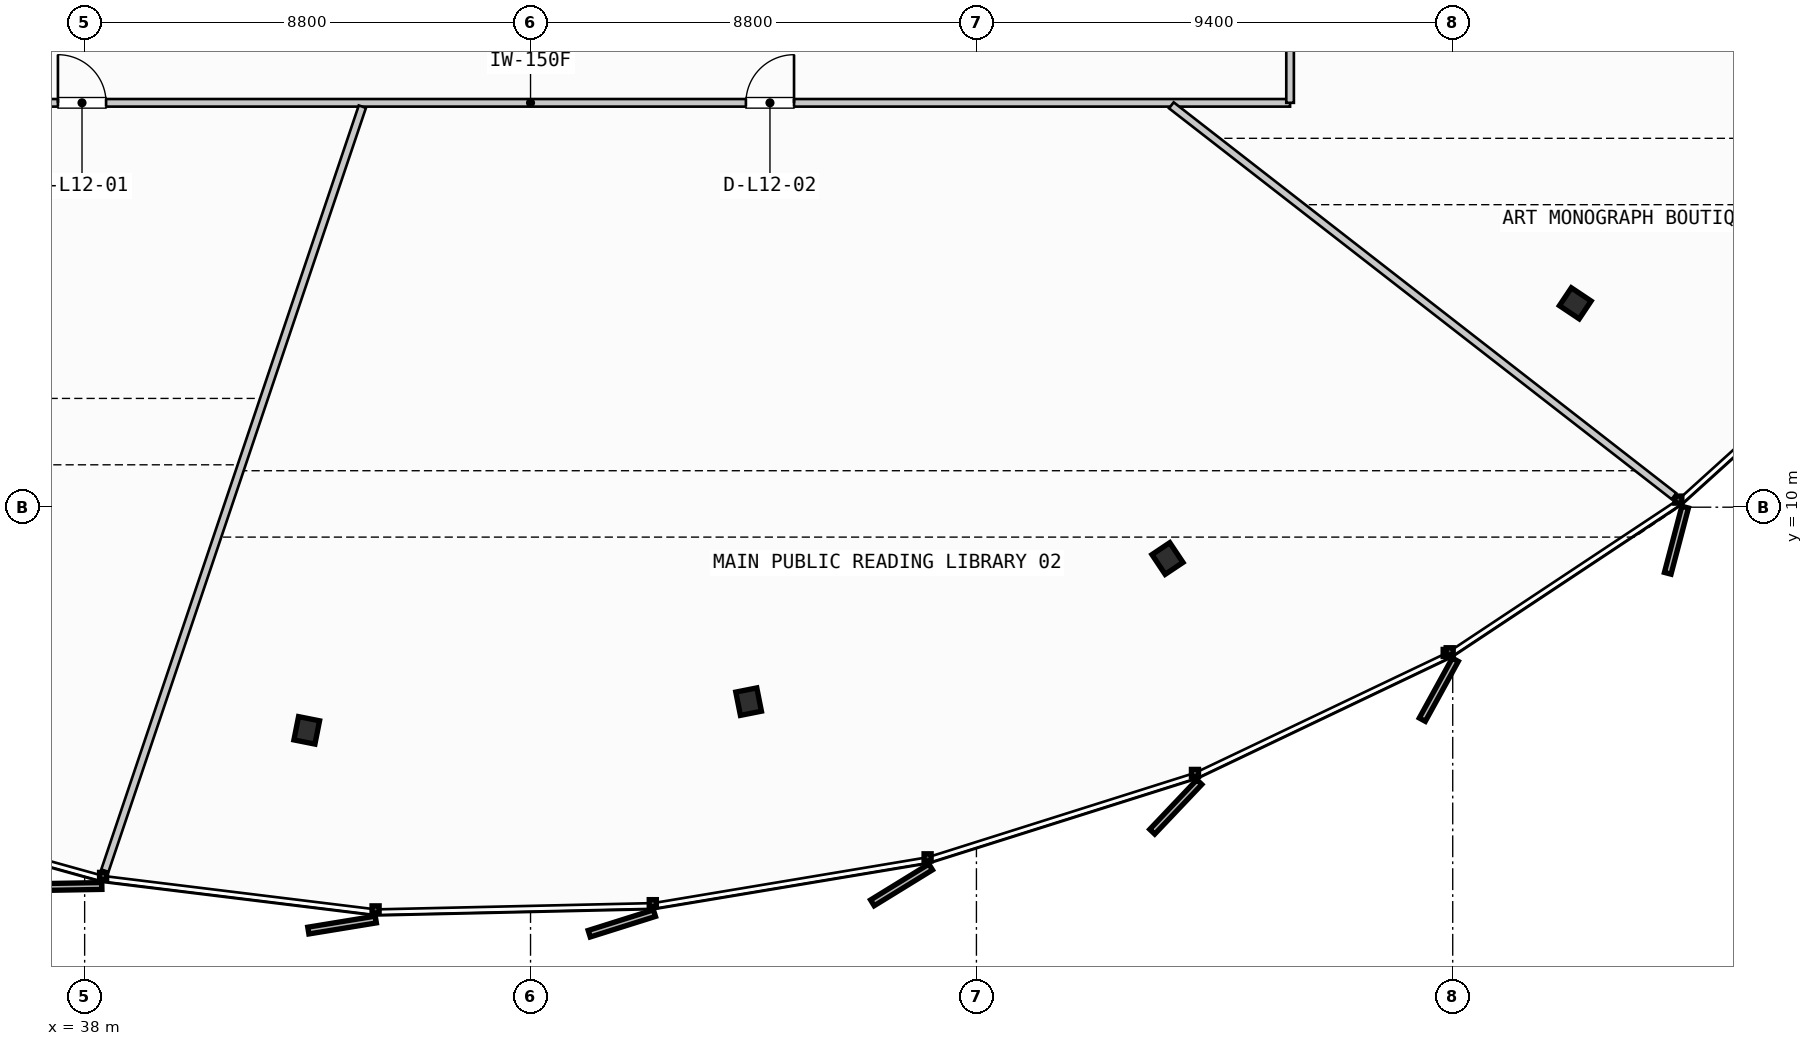
"""IFC4 building model, lengths in metres.
Left out: names, types, materials, properties, quantities, classifications, styles, units other than length and angle.
Written with IfcOpenShell. Run it as: python <this file> out.ifc"""

import sys

from ifc_helpers import new_model, si_unit, direction, frame, frame_2d, origin, origin_2d, place, context, subcontext, project, spatial, rectangle, i_section, extrude, source, transform, mapped, element, fill, save


model = new_model("IFC4")
c1 = context("Model", 3, precision=1e-05, world=origin(), true_north=direction((0.0, 1.0)))
c2 = subcontext(c1, "Body", "Model", "MODEL_VIEW")
j1 = project(units=[si_unit("LENGTHUNIT", "METRE"), si_unit("PLANEANGLEUNIT", "RADIAN")], contexts=[c1])
p1 = place(None, origin())
s1 = spatial("IfcSite", under=j1, at=p1, CompositionType="ELEMENT")
p2 = place(p1, origin())
s2 = spatial("IfcBuilding", under=s1, at=p2, CompositionType="ELEMENT")
p3 = place(p2, frame((0.0, 0.0, 52.4)))
s3 = spatial("IfcBuildingStorey", under=s2, at=p3, CompositionType="ELEMENT", Elevation=52.4)
m1 = source(origin(), c2, "Body", "SweptSolid", [
    extrude(i_section(OverallWidth=0.423, OverallDepth=0.469, WebThickness=0.051, FlangeThickness=0.081, FilletRadius=0.015, at=origin_2d()), origin(), (0.0, 0.0, 1.0), 3.55),
])
for number, where, z_axis, x_axis in (
    (1, (42.383, 5.596, 0.0), (0.0, 0.0, 1.0), (-0.195, -0.981, 0.0)),
    (2, (51.104, 6.163, 0.0), (0.0, 0.0, 1.0), (0.195, -0.981, 0.0)),
    (3, (59.37, 8.987, 0.0), (0.0, 0.0, 1.0), (0.556, -0.831, 0.0)),
    (4, (67.418, 14.023, 0.0), (0.0, 0.0, 1.0), (0.831, -0.556, 0.0)),
):
    element("IfcColumn", number, at=place(p3, frame(where, z_axis=z_axis, x_axis=x_axis)), inside=s3, PredefinedType="COLUMN", context=c2, shape_type="MappedRepresentation", body=[
        mapped(m1, transform((0.0, 0.0, 0.0), scale=1.0)),
    ])
p4 = place(p3, frame((31.81, 17.98, 0.0), z_axis=(0.0, 0.0, 1.0), x_axis=(1.0, 0.0, 0.0)))
e5 = element("IfcWall", 5, at=p4, inside=s3, PredefinedType="PARTITIONING", context=c2, shape_type="SweptSolid", body=[
    extrude(rectangle(XDim=29.98, YDim=0.15, at=frame_2d((14.99, 0.0))), origin(), (0.0, 0.0, 1.0), 2.645),
])
p5 = place(p4, frame((5.663, 0.0, 0.0)))
e6 = element("IfcOpeningElement", 6, at=p5, cuts=e5, PredefinedType="OPENING", context=c2, shape_type="SweptSolid", body=[
    extrude(rectangle(XDim=0.95, YDim=2.15, at=frame_2d((0.475, 1.075))), frame((0.0, 0.085, 0.0), z_axis=(0.0, -1.0, 0.0), x_axis=(1.0, 0.0, 0.0)), (0.0, 0.0, 1.0), 0.17),
])
p6 = place(p4, frame((19.24, 0.0, 0.0)))
e7 = element("IfcOpeningElement", 7, at=p6, cuts=e5, PredefinedType="OPENING", context=c2, shape_type="SweptSolid", body=[
    extrude(rectangle(XDim=0.95, YDim=2.15, at=frame_2d((0.475, 1.075))), frame((0.0, 0.085, 0.0), z_axis=(0.0, -1.0, 0.0), x_axis=(1.0, 0.0, 0.0)), (0.0, 0.0, 1.0), 0.17),
])
p7 = place(p3, frame((61.79, 17.98, 0.0), z_axis=(0.0, 0.0, 1.0), x_axis=(0.0, 1.0, 0.0)))
e8 = element("IfcWall", 8, at=p7, inside=s3, PredefinedType="PARTITIONING", context=c2, shape_type="SweptSolid", body=[
    extrude(rectangle(XDim=19.22, YDim=0.15, at=frame_2d((9.61, 0.0))), origin(), (0.0, 0.0, 1.0), 2.645),
])
p8 = place(p7, frame((2.175, 0.0, 0.0)))
e9 = element("IfcOpeningElement", 9, at=p8, cuts=e8, PredefinedType="OPENING", context=c2, shape_type="SweptSolid", body=[
    extrude(rectangle(XDim=0.95, YDim=2.15, at=frame_2d((0.475, 1.075))), frame((0.0, 0.085, 0.0), z_axis=(0.0, -1.0, 0.0), x_axis=(1.0, 0.0, 0.0)), (0.0, 0.0, 1.0), 0.17),
])
p9 = place(p7, frame((6.482, 0.0, 0.0)))
e10 = element("IfcOpeningElement", 10, at=p9, cuts=e8, PredefinedType="OPENING", context=c2, shape_type="SweptSolid", body=[
    extrude(rectangle(XDim=0.95, YDim=2.15, at=frame_2d((0.475, 1.075))), frame((0.0, 0.085, 0.0), z_axis=(0.0, -1.0, 0.0), x_axis=(1.0, 0.0, 0.0)), (0.0, 0.0, 1.0), 0.17),
])
p10 = place(p7, frame((13.317, 0.0, 0.0)))
e11 = element("IfcOpeningElement", 11, at=p10, cuts=e8, PredefinedType="OPENING", context=c2, shape_type="SweptSolid", body=[
    extrude(rectangle(XDim=0.95, YDim=2.15, at=frame_2d((0.475, 1.075))), frame((0.0, 0.085, 0.0), z_axis=(0.0, -1.0, 0.0), x_axis=(1.0, 0.0, 0.0)), (0.0, 0.0, 1.0), 0.17),
])
p11 = place(p3, frame((43.481, 17.904, 0.0), z_axis=(0.0, 0.0, 1.0), x_axis=(-0.319393235536, -0.947622267095, 0.0)))
e12 = element("IfcWall", 12, at=p11, inside=s3, PredefinedType="PARTITIONING", context=c2, shape_type="SweptSolid", body=[
    extrude(rectangle(XDim=15.91, YDim=0.15, at=frame_2d((7.955, 0.0))), origin(), (0.0, 0.0, 1.0), 2.645),
])
p12 = place(p3, frame((59.447, 17.931, 0.0), z_axis=(0.0, 0.0, 1.0), x_axis=(0.789361633342, -0.613928507082, 0.0)))
e13 = element("IfcWall", 13, at=p12, inside=s3, PredefinedType="PARTITIONING", context=c2, shape_type="SweptSolid", body=[
    extrude(rectangle(XDim=12.565, YDim=0.15, at=frame_2d((6.283, 0.0))), origin(), (0.0, 0.0, 1.0), 2.645),
])
p13 = place(p3, frame((61.866, 22.675, 0.0), z_axis=(0.0, 0.0, 1.0), x_axis=(0.947095534469, -0.320951785457, 0.0)))
e14 = element("IfcWall", 14, at=p13, inside=s3, PredefinedType="PARTITIONING", context=c2, shape_type="SweptSolid", body=[
    extrude(rectangle(XDim=15.398, YDim=0.15, at=frame_2d((7.699, 0.0))), origin(), (0.0, 0.0, 1.0), 2.645),
])
m2 = source(origin(), c2, "Body", "SweptSolid", [
    extrude(rectangle(XDim=0.95, YDim=2.15, at=frame_2d((0.475, 1.075))), frame((0.0, 0.025, 0.0), z_axis=(0.0, -1.0, 0.0), x_axis=(1.0, 0.0, 0.0)), (0.0, 0.0, 1.0), 0.05),
])
p14 = place(p5, origin())
e15 = element("IfcDoor", 15, at=p14, inside=s3, OperationType="SINGLE_SWING_LEFT", PredefinedType="DOOR", context=c2, shape_type="MappedRepresentation", body=[
    mapped(m2, transform((0.0, 0.0, 0.0), scale=1.0)),
])
fill(e6, e15)
p15 = place(p6, origin())
e16 = element("IfcDoor", 16, at=p15, inside=s3, OperationType="SINGLE_SWING_RIGHT", PredefinedType="DOOR", context=c2, shape_type="MappedRepresentation", body=[
    mapped(m2, transform((0.0, 0.0, 0.0), scale=1.0)),
])
fill(e7, e16)
save(model, sys.argv[1])
